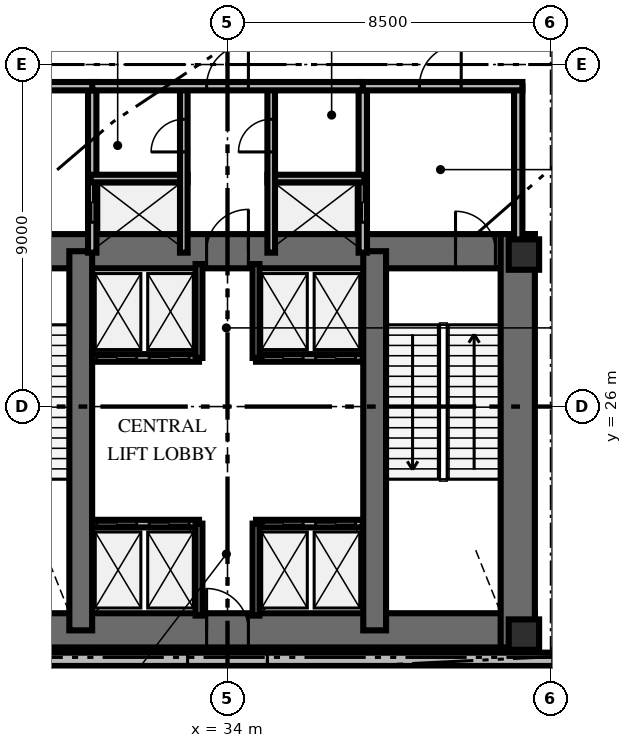
"""IFC4 building model, lengths in metres.
Left out: names, types, materials, properties, quantities, classifications, styles, units other than length and angle.
Written with IfcOpenShell. Run it as: python <this file> out.ifc"""

import sys

from ifc_helpers import new_model, si_unit, direction, frame, frame_2d, origin, origin_2d, place, context, subcontext, project, spatial, rectangle, extrude, element, fill, save


model = new_model("IFC4")
c1 = context("Model", 3, precision=1e-05, world=origin(), true_north=direction((0.0, 1.0)))
c2 = subcontext(c1, "Body", "Model", "MODEL_VIEW")
j1 = project(units=[si_unit("LENGTHUNIT", "METRE"), si_unit("PLANEANGLEUNIT", "RADIAN")], contexts=[c1])
p1 = place(None, origin())
s1 = spatial("IfcSite", under=j1, at=p1, CompositionType="ELEMENT")
p2 = place(p1, origin())
s2 = spatial("IfcBuilding", under=s1, at=p2, CompositionType="ELEMENT")
p3 = place(p2, origin())
s3 = spatial("IfcBuildingStorey", under=s2, at=p3, CompositionType="ELEMENT", Elevation=0.0)
p4 = place(p3, frame((25.922, 20.112, 0.0), z_axis=(0.0, 0.0, 1.0), x_axis=(1.0, 0.0, 0.0)))
e1 = element("IfcWall", 1, at=p4, inside=s3, PredefinedType="SHEAR", context=c2, shape_type="SweptSolid", body=[
    extrude(rectangle(XDim=16.166, YDim=0.9, at=frame_2d((8.083, 0.0))), origin(), (0.0, 0.0, 1.0), 5.4),
])
p5 = place(p4, frame((7.528, 0.0, 0.0)))
e2 = element("IfcOpeningElement", 2, at=p5, cuts=e1, PredefinedType="OPENING", context=c2, shape_type="SweptSolid", body=[
    extrude(rectangle(XDim=1.1, YDim=2.15, at=frame_2d((0.55, 1.075))), frame((0.0, 0.46, 0.0), z_axis=(0.0, -1.0, 0.0), x_axis=(1.0, 0.0, 0.0)), (0.0, 0.0, 1.0), 0.92),
])
p6 = place(p3, frame((25.922, 30.088, 0.0), z_axis=(0.0, 0.0, 1.0), x_axis=(1.0, 0.0, 0.0)))
e3 = element("IfcWall", 3, at=p6, inside=s3, PredefinedType="SHEAR", context=c2, shape_type="SweptSolid", body=[
    extrude(rectangle(XDim=16.166, YDim=0.9, at=frame_2d((8.083, 0.0))), origin(), (0.0, 0.0, 1.0), 5.4),
])
p7 = place(p6, frame((1.028, 0.0, 0.0)))
e4 = element("IfcOpeningElement", 4, at=p7, cuts=e3, PredefinedType="OPENING", context=c2, shape_type="SweptSolid", body=[
    extrude(rectangle(XDim=1.05, YDim=2.15, at=frame_2d((0.525, 1.075))), frame((0.0, 0.46, 0.0), z_axis=(0.0, -1.0, 0.0), x_axis=(1.0, 0.0, 0.0)), (0.0, 0.0, 1.0), 0.92),
])
p8 = place(p6, frame((14.078, 0.0, 0.0)))
e5 = element("IfcOpeningElement", 5, at=p8, cuts=e3, PredefinedType="OPENING", context=c2, shape_type="SweptSolid", body=[
    extrude(rectangle(XDim=1.05, YDim=2.15, at=frame_2d((0.525, 1.075))), frame((0.0, 0.46, 0.0), z_axis=(0.0, -1.0, 0.0), x_axis=(1.0, 0.0, 0.0)), (0.0, 0.0, 1.0), 0.92),
])
p9 = place(p6, frame((7.528, 0.0, 0.0)))
e6 = element("IfcOpeningElement", 6, at=p9, cuts=e3, PredefinedType="OPENING", context=c2, shape_type="SweptSolid", body=[
    extrude(rectangle(XDim=1.1, YDim=2.15, at=frame_2d((0.55, 1.075))), frame((0.0, 0.46, 0.0), z_axis=(0.0, -1.0, 0.0), x_axis=(1.0, 0.0, 0.0)), (0.0, 0.0, 1.0), 0.92),
])
p10 = place(p3, frame((41.638, 19.662, 0.0), z_axis=(0.0, 0.0, 1.0), x_axis=(0.0, 1.0, 0.0)))
e7 = element("IfcWall", 7, at=p10, inside=s3, PredefinedType="SHEAR", context=c2, shape_type="SweptSolid", body=[
    extrude(rectangle(XDim=10.876, YDim=0.9, at=frame_2d((5.438, 0.0))), origin(), (0.0, 0.0, 1.0), 5.4),
])
for number, where, z_axis, x_axis in (
    (8, (30.138, 20.112, 0.0), (0.0, 0.0, 1.0), (0.0, 1.0, 0.0)),
    (9, (37.872, 20.112, 0.0), (0.0, 0.0, 1.0), (0.0, 1.0, 0.0)),
):
    element("IfcWall", number, at=place(p3, frame(where, z_axis=z_axis, x_axis=x_axis)), inside=s3, PredefinedType="SHEAR", context=c2, shape_type="SweptSolid", body=[
        extrude(rectangle(XDim=9.976, YDim=0.6, at=frame_2d((4.988, 0.0))), origin(), (0.0, 0.0, 1.0), 5.4),
    ])
for number, where, z_axis, x_axis in (
    (10, (41.8, 20.0, 0.0), (0.0, 0.0, 1.0), (1.0, 0.0, 0.0)),
    (11, (41.8, 30.0, 0.0), (0.0, 0.0, 1.0), (1.0, 0.0, 0.0)),
):
    element("IfcColumn", number, at=place(p3, frame(where, z_axis=z_axis, x_axis=x_axis)), inside=s3, PredefinedType="PILASTER", context=c2, shape_type="SweptSolid", body=[
        extrude(rectangle(XDim=0.8, YDim=0.8, at=origin_2d()), origin(), (0.0, 0.0, 1.0), 5.4),
    ])
p11 = place(p3, frame((42.62, 19.35, 0.0), z_axis=(0.0, 0.0, 1.0), x_axis=(-1.0, 0.0, 0.0)))
e12 = element("IfcWall", 12, at=p11, inside=s3, PredefinedType="SOLIDWALL", context=c2, shape_type="SweptSolid", body=[
    extrude(rectangle(XDim=17.24, YDim=0.35, at=frame_2d((8.62, 0.0))), origin(), (0.0, 0.0, 1.0), 4.36),
])
p12 = place(p11, frame((7.57, 0.0, 0.0)))
e13 = element("IfcOpeningElement", 13, at=p12, cuts=e12, PredefinedType="OPENING", context=c2, shape_type="SweptSolid", body=[
    extrude(rectangle(XDim=2.1, YDim=2.35, at=frame_2d((1.05, 1.175))), frame((0.0, 0.185, 0.0), z_axis=(0.0, -1.0, 0.0), x_axis=(1.0, 0.0, 0.0)), (0.0, 0.0, 1.0), 0.37),
])
p13 = place(p3, frame((30.44, 30.05, 0.0), z_axis=(0.0, 0.0, 1.0), x_axis=(0.0, 1.0, 0.0)))
e14 = element("IfcWall", 14, at=p13, inside=s3, PredefinedType="SOLIDWALL", context=c2, shape_type="SweptSolid", body=[
    extrude(rectangle(XDim=4.38, YDim=0.22, at=frame_2d((2.19, 0.0))), origin(), (0.0, 0.0, 1.0), 4.16),
])
p14 = place(p13, frame((0.8, 0.0, 0.0)))
e15 = element("IfcOpeningElement", 15, at=p14, cuts=e14, PredefinedType="OPENING", context=c2, shape_type="SweptSolid", body=[
    extrude(rectangle(XDim=1.05, YDim=2.1, at=frame_2d((0.525, 1.05))), frame((0.0, 0.12, 0.0), z_axis=(0.0, -1.0, 0.0), x_axis=(1.0, 0.0, 0.0)), (0.0, 0.0, 1.0), 0.24),
])
p15 = place(p3, frame((26.24, 34.43, 0.0), z_axis=(0.0, 0.0, 1.0), x_axis=(1.0, 0.0, 0.0)))
e16 = element("IfcWall", 16, at=p15, inside=s3, PredefinedType="SOLIDWALL", context=c2, shape_type="SweptSolid", body=[
    extrude(rectangle(XDim=4.31, YDim=0.22, at=frame_2d((2.155, 0.0))), origin(), (0.0, 0.0, 1.0), 4.16),
])
p16 = place(p15, frame((1.6, 0.0, 0.0)))
e17 = element("IfcOpeningElement", 17, at=p16, cuts=e16, PredefinedType="OPENING", context=c2, shape_type="SweptSolid", body=[
    extrude(rectangle(XDim=1.1, YDim=2.15, at=frame_2d((0.55, 1.075))), frame((0.0, 0.12, 0.0), z_axis=(0.0, -1.0, 0.0), x_axis=(1.0, 0.0, 0.0)), (0.0, 0.0, 1.0), 0.24),
])
p17 = place(p3, frame((30.4, 32.0, 0.0), z_axis=(0.0, 0.0, 1.0), x_axis=(1.0, 0.0, 0.0)))
e18 = element("IfcWall", 18, at=p17, inside=s3, PredefinedType="SOLIDWALL", context=c2, shape_type="SweptSolid", body=[
    extrude(rectangle(XDim=2.55, YDim=0.2, at=frame_2d((1.275, 0.0))), origin(), (0.0, 0.0, 1.0), 4.16),
])
p18 = place(p3, frame((32.85, 30.05, 0.0), z_axis=(0.0, 0.0, 1.0), x_axis=(0.0, 1.0, 0.0)))
e19 = element("IfcWall", 19, at=p18, inside=s3, PredefinedType="SOLIDWALL", context=c2, shape_type="SweptSolid", body=[
    extrude(rectangle(XDim=4.38, YDim=0.2, at=frame_2d((2.19, 0.0))), origin(), (0.0, 0.0, 1.0), 4.16),
])
p19 = place(p18, frame((2.65, 0.0, 0.0)))
e20 = element("IfcOpeningElement", 20, at=p19, cuts=e19, PredefinedType="OPENING", context=c2, shape_type="SweptSolid", body=[
    extrude(rectangle(XDim=0.86, YDim=2.05, at=frame_2d((0.43, 1.025))), frame((0.0, 0.11, 0.0), z_axis=(0.0, -1.0, 0.0), x_axis=(1.0, 0.0, 0.0)), (0.0, 0.0, 1.0), 0.22),
])
p20 = place(p3, frame((37.56, 30.05, 0.0), z_axis=(0.0, 0.0, 1.0), x_axis=(0.0, 1.0, 0.0)))
e21 = element("IfcWall", 21, at=p20, inside=s3, PredefinedType="SOLIDWALL", context=c2, shape_type="SweptSolid", body=[
    extrude(rectangle(XDim=4.38, YDim=0.22, at=frame_2d((2.19, 0.0))), origin(), (0.0, 0.0, 1.0), 4.16),
])
p21 = place(p20, frame((0.8, 0.0, 0.0)))
e22 = element("IfcOpeningElement", 22, at=p21, cuts=e21, PredefinedType="OPENING", context=c2, shape_type="SweptSolid", body=[
    extrude(rectangle(XDim=1.05, YDim=2.1, at=frame_2d((0.525, 1.05))), frame((0.0, 0.12, 0.0), z_axis=(0.0, -1.0, 0.0), x_axis=(1.0, 0.0, 0.0)), (0.0, 0.0, 1.0), 0.24),
])
p22 = place(p3, frame((41.65, 30.05, 0.0), z_axis=(0.0, 0.0, 1.0), x_axis=(0.0, 1.0, 0.0)))
e23 = element("IfcWall", 23, at=p22, inside=s3, PredefinedType="SOLIDWALL", context=c2, shape_type="SweptSolid", body=[
    extrude(rectangle(XDim=4.38, YDim=0.22, at=frame_2d((2.19, 0.0))), origin(), (0.0, 0.0, 1.0), 4.16),
])
p23 = place(p3, frame((37.45, 34.43, 0.0), z_axis=(0.0, 0.0, 1.0), x_axis=(1.0, 0.0, 0.0)))
e24 = element("IfcWall", 24, at=p23, inside=s3, PredefinedType="SOLIDWALL", context=c2, shape_type="SweptSolid", body=[
    extrude(rectangle(XDim=4.31, YDim=0.22, at=frame_2d((2.155, 0.0))), origin(), (0.0, 0.0, 1.0), 4.16),
])
p24 = place(p23, frame((1.6, 0.0, 0.0)))
e25 = element("IfcOpeningElement", 25, at=p24, cuts=e24, PredefinedType="OPENING", context=c2, shape_type="SweptSolid", body=[
    extrude(rectangle(XDim=1.1, YDim=2.15, at=frame_2d((0.55, 1.075))), frame((0.0, 0.12, 0.0), z_axis=(0.0, -1.0, 0.0), x_axis=(1.0, 0.0, 0.0)), (0.0, 0.0, 1.0), 0.24),
])
p25 = place(p3, frame((35.05, 32.0, 0.0), z_axis=(0.0, 0.0, 1.0), x_axis=(1.0, 0.0, 0.0)))
e26 = element("IfcWall", 26, at=p25, inside=s3, PredefinedType="SOLIDWALL", context=c2, shape_type="SweptSolid", body=[
    extrude(rectangle(XDim=2.55, YDim=0.2, at=frame_2d((1.275, 0.0))), origin(), (0.0, 0.0, 1.0), 4.16),
])
p26 = place(p3, frame((35.15, 30.05, 0.0), z_axis=(0.0, 0.0, 1.0), x_axis=(0.0, 1.0, 0.0)))
e27 = element("IfcWall", 27, at=p26, inside=s3, PredefinedType="SOLIDWALL", context=c2, shape_type="SweptSolid", body=[
    extrude(rectangle(XDim=4.38, YDim=0.2, at=frame_2d((2.19, 0.0))), origin(), (0.0, 0.0, 1.0), 4.16),
])
p27 = place(p26, frame((2.65, 0.0, 0.0)))
e28 = element("IfcOpeningElement", 28, at=p27, cuts=e27, PredefinedType="OPENING", context=c2, shape_type="SweptSolid", body=[
    extrude(rectangle(XDim=0.86, YDim=2.05, at=frame_2d((0.43, 1.025))), frame((0.0, 0.11, 0.0), z_axis=(0.0, -1.0, 0.0), x_axis=(1.0, 0.0, 0.0)), (0.0, 0.0, 1.0), 0.22),
])
p28 = place(p3, frame((30.44, 34.43, 0.0), z_axis=(0.0, 0.0, 1.0), x_axis=(1.0, 0.0, 0.0)))
e29 = element("IfcWall", 29, at=p28, inside=s3, PredefinedType="SOLIDWALL", context=c2, shape_type="SweptSolid", body=[
    extrude(rectangle(XDim=7.12, YDim=0.22, at=frame_2d((3.56, 0.0))), origin(), (0.0, 0.0, 1.0), 4.16),
])
p29 = place(p28, frame((3.01, 0.0, 0.0)))
e30 = element("IfcOpeningElement", 30, at=p29, cuts=e29, PredefinedType="OPENING", context=c2, shape_type="SweptSolid", body=[
    extrude(rectangle(XDim=1.1, YDim=2.15, at=frame_2d((0.55, 1.075))), frame((0.0, 0.12, 0.0), z_axis=(0.0, -1.0, 0.0), x_axis=(1.0, 0.0, 0.0)), (0.0, 0.0, 1.0), 0.24),
])
p30 = place(p3, frame((30.44, 22.92, 0.0), z_axis=(0.0, 0.0, 1.0), x_axis=(1.0, 0.0, 0.0)))
e31 = element("IfcWall", 31, at=p30, inside=s3, PredefinedType="SOLIDWALL", context=c2, shape_type="SweptSolid", body=[
    extrude(rectangle(XDim=2.81, YDim=0.2, at=frame_2d((1.405, 0.0))), origin(), (0.0, 0.0, 1.0), 4.16),
])
p31 = place(p30, frame((0.12, 0.0, 0.0)))
e32 = element("IfcOpeningElement", 32, at=p31, cuts=e31, PredefinedType="OPENING", context=c2, shape_type="SweptSolid", body=[
    extrude(rectangle(XDim=1.05, YDim=2.1, at=frame_2d((0.525, 1.05))), frame((0.0, 0.11, 0.0), z_axis=(0.0, -1.0, 0.0), x_axis=(1.0, 0.0, 0.0)), (0.0, 0.0, 1.0), 0.22),
])
p32 = place(p30, frame((1.5, 0.0, 0.0)))
e33 = element("IfcOpeningElement", 33, at=p32, cuts=e31, PredefinedType="OPENING", context=c2, shape_type="SweptSolid", body=[
    extrude(rectangle(XDim=1.05, YDim=2.1, at=frame_2d((0.525, 1.05))), frame((0.0, 0.11, 0.0), z_axis=(0.0, -1.0, 0.0), x_axis=(1.0, 0.0, 0.0)), (0.0, 0.0, 1.0), 0.22),
])
p33 = place(p3, frame((33.25, 20.5, 0.0), z_axis=(0.0, 0.0, 1.0), x_axis=(0.0, 1.0, 0.0)))
e34 = element("IfcWall", 34, at=p33, inside=s3, PredefinedType="SOLIDWALL", context=c2, shape_type="SweptSolid", body=[
    extrude(rectangle(XDim=2.42, YDim=0.18, at=frame_2d((1.21, 0.0))), origin(), (0.0, 0.0, 1.0), 4.16),
])
p34 = place(p3, frame((34.75, 22.92, 0.0), z_axis=(0.0, 0.0, 1.0), x_axis=(1.0, 0.0, 0.0)))
e35 = element("IfcWall", 35, at=p34, inside=s3, PredefinedType="SOLIDWALL", context=c2, shape_type="SweptSolid", body=[
    extrude(rectangle(XDim=2.81, YDim=0.2, at=frame_2d((1.405, 0.0))), origin(), (0.0, 0.0, 1.0), 4.16),
])
p35 = place(p34, frame((0.19, 0.0, 0.0)))
e36 = element("IfcOpeningElement", 36, at=p35, cuts=e35, PredefinedType="OPENING", context=c2, shape_type="SweptSolid", body=[
    extrude(rectangle(XDim=1.05, YDim=2.1, at=frame_2d((0.525, 1.05))), frame((0.0, 0.11, 0.0), z_axis=(0.0, -1.0, 0.0), x_axis=(1.0, 0.0, 0.0)), (0.0, 0.0, 1.0), 0.22),
])
p36 = place(p34, frame((1.57, 0.0, 0.0)))
e37 = element("IfcOpeningElement", 37, at=p36, cuts=e35, PredefinedType="OPENING", context=c2, shape_type="SweptSolid", body=[
    extrude(rectangle(XDim=1.05, YDim=2.1, at=frame_2d((0.525, 1.05))), frame((0.0, 0.11, 0.0), z_axis=(0.0, -1.0, 0.0), x_axis=(1.0, 0.0, 0.0)), (0.0, 0.0, 1.0), 0.22),
])
p37 = place(p3, frame((34.75, 20.5, 0.0), z_axis=(0.0, 0.0, 1.0), x_axis=(0.0, 1.0, 0.0)))
e38 = element("IfcWall", 38, at=p37, inside=s3, PredefinedType="SOLIDWALL", context=c2, shape_type="SweptSolid", body=[
    extrude(rectangle(XDim=2.42, YDim=0.18, at=frame_2d((1.21, 0.0))), origin(), (0.0, 0.0, 1.0), 4.16),
])
p38 = place(p3, frame((30.44, 27.28, 0.0), z_axis=(0.0, 0.0, 1.0), x_axis=(1.0, 0.0, 0.0)))
e39 = element("IfcWall", 39, at=p38, inside=s3, PredefinedType="SOLIDWALL", context=c2, shape_type="SweptSolid", body=[
    extrude(rectangle(XDim=2.81, YDim=0.2, at=frame_2d((1.405, 0.0))), origin(), (0.0, 0.0, 1.0), 4.16),
])
p39 = place(p38, frame((0.12, 0.0, 0.0)))
e40 = element("IfcOpeningElement", 40, at=p39, cuts=e39, PredefinedType="OPENING", context=c2, shape_type="SweptSolid", body=[
    extrude(rectangle(XDim=1.05, YDim=2.1, at=frame_2d((0.525, 1.05))), frame((0.0, 0.11, 0.0), z_axis=(0.0, -1.0, 0.0), x_axis=(1.0, 0.0, 0.0)), (0.0, 0.0, 1.0), 0.22),
])
p40 = place(p38, frame((1.5, 0.0, 0.0)))
e41 = element("IfcOpeningElement", 41, at=p40, cuts=e39, PredefinedType="OPENING", context=c2, shape_type="SweptSolid", body=[
    extrude(rectangle(XDim=1.05, YDim=2.1, at=frame_2d((0.525, 1.05))), frame((0.0, 0.11, 0.0), z_axis=(0.0, -1.0, 0.0), x_axis=(1.0, 0.0, 0.0)), (0.0, 0.0, 1.0), 0.22),
])
p41 = place(p3, frame((33.25, 27.28, 0.0), z_axis=(0.0, 0.0, 1.0), x_axis=(0.0, 1.0, 0.0)))
e42 = element("IfcWall", 42, at=p41, inside=s3, PredefinedType="SOLIDWALL", context=c2, shape_type="SweptSolid", body=[
    extrude(rectangle(XDim=2.47, YDim=0.18, at=frame_2d((1.235, 0.0))), origin(), (0.0, 0.0, 1.0), 4.16),
])
p42 = place(p3, frame((34.75, 27.28, 0.0), z_axis=(0.0, 0.0, 1.0), x_axis=(1.0, 0.0, 0.0)))
e43 = element("IfcWall", 43, at=p42, inside=s3, PredefinedType="SOLIDWALL", context=c2, shape_type="SweptSolid", body=[
    extrude(rectangle(XDim=2.81, YDim=0.2, at=frame_2d((1.405, 0.0))), origin(), (0.0, 0.0, 1.0), 4.16),
])
p43 = place(p42, frame((0.19, 0.0, 0.0)))
e44 = element("IfcOpeningElement", 44, at=p43, cuts=e43, PredefinedType="OPENING", context=c2, shape_type="SweptSolid", body=[
    extrude(rectangle(XDim=1.05, YDim=2.1, at=frame_2d((0.525, 1.05))), frame((0.0, 0.11, 0.0), z_axis=(0.0, -1.0, 0.0), x_axis=(1.0, 0.0, 0.0)), (0.0, 0.0, 1.0), 0.22),
])
p44 = place(p42, frame((1.57, 0.0, 0.0)))
e45 = element("IfcOpeningElement", 45, at=p44, cuts=e43, PredefinedType="OPENING", context=c2, shape_type="SweptSolid", body=[
    extrude(rectangle(XDim=1.05, YDim=2.1, at=frame_2d((0.525, 1.05))), frame((0.0, 0.11, 0.0), z_axis=(0.0, -1.0, 0.0), x_axis=(1.0, 0.0, 0.0)), (0.0, 0.0, 1.0), 0.22),
])
p45 = place(p3, frame((34.75, 27.28, 0.0), z_axis=(0.0, 0.0, 1.0), x_axis=(0.0, 1.0, 0.0)))
e46 = element("IfcWall", 46, at=p45, inside=s3, PredefinedType="SOLIDWALL", context=c2, shape_type="SweptSolid", body=[
    extrude(rectangle(XDim=2.47, YDim=0.18, at=frame_2d((1.235, 0.0))), origin(), (0.0, 0.0, 1.0), 4.16),
])
p46 = place(p12, origin())
e47 = element("IfcDoor", 47, at=p46, inside=s3, OperationType="DOUBLE_DOOR_SINGLE_SWING", PredefinedType="DOOR", context=c2, shape_type="SweptSolid", body=[
    extrude(rectangle(XDim=2.1, YDim=2.35, at=frame_2d((1.05, 1.175))), frame((0.0, 0.025, 0.0), z_axis=(0.0, -1.0, 0.0), x_axis=(1.0, 0.0, 0.0)), (0.0, 0.0, 1.0), 0.05),
])
fill(e13, e47)
p47 = place(p8, origin())
e48 = element("IfcDoor", 48, at=p47, inside=s3, OperationType="SINGLE_SWING_LEFT", PredefinedType="DOOR", context=c2, shape_type="SweptSolid", body=[
    extrude(rectangle(XDim=1.05, YDim=2.15, at=frame_2d((0.525, 1.075))), frame((0.0, 0.025, 0.0), z_axis=(0.0, -1.0, 0.0), x_axis=(1.0, 0.0, 0.0)), (0.0, 0.0, 1.0), 0.05),
])
fill(e5, e48)
p48 = place(p9, origin())
e49 = element("IfcDoor", 49, at=p48, inside=s3, OperationType="SINGLE_SWING_RIGHT", PredefinedType="DOOR", context=c2, shape_type="SweptSolid", body=[
    extrude(rectangle(XDim=1.1, YDim=2.15, at=frame_2d((0.55, 1.075))), frame((0.0, 0.025, 0.0), z_axis=(0.0, -1.0, 0.0), x_axis=(1.0, 0.0, 0.0)), (0.0, 0.0, 1.0), 0.05),
])
fill(e6, e49)
p49 = place(p5, origin())
e50 = element("IfcDoor", 50, at=p49, inside=s3, OperationType="SINGLE_SWING_LEFT", PredefinedType="DOOR", context=c2, shape_type="SweptSolid", body=[
    extrude(rectangle(XDim=1.1, YDim=2.15, at=frame_2d((0.55, 1.075))), frame((0.0, 0.025, 0.0), z_axis=(0.0, -1.0, 0.0), x_axis=(1.0, 0.0, 0.0)), (0.0, 0.0, 1.0), 0.05),
])
fill(e2, e50)
p50 = place(p14, origin())
e51 = element("IfcDoor", 51, at=p50, inside=s3, OperationType="DOUBLE_DOOR_SLIDING", PredefinedType="USERDEFINED", context=c2, shape_type="SweptSolid", body=[
    extrude(rectangle(XDim=1.05, YDim=2.1, at=frame_2d((0.525, 1.05))), frame((0.0, 0.025, 0.0), z_axis=(0.0, -1.0, 0.0), x_axis=(1.0, 0.0, 0.0)), (0.0, 0.0, 1.0), 0.05),
])
fill(e15, e51)
p51 = place(p19, origin())
e52 = element("IfcDoor", 52, at=p51, inside=s3, OperationType="SINGLE_SWING_LEFT", PredefinedType="TRAPDOOR", context=c2, shape_type="SweptSolid", body=[
    extrude(rectangle(XDim=0.86, YDim=2.05, at=frame_2d((0.43, 1.025))), frame((0.0, 0.025, 0.0), z_axis=(0.0, -1.0, 0.0), x_axis=(1.0, 0.0, 0.0)), (0.0, 0.0, 1.0), 0.05),
])
fill(e20, e52)
p52 = place(p24, origin())
e53 = element("IfcDoor", 53, at=p52, inside=s3, OperationType="SINGLE_SWING_RIGHT", PredefinedType="DOOR", context=c2, shape_type="SweptSolid", body=[
    extrude(rectangle(XDim=1.1, YDim=2.15, at=frame_2d((0.55, 1.075))), frame((0.0, 0.025, 0.0), z_axis=(0.0, -1.0, 0.0), x_axis=(1.0, 0.0, 0.0)), (0.0, 0.0, 1.0), 0.05),
])
fill(e25, e53)
p53 = place(p21, origin())
e54 = element("IfcDoor", 54, at=p53, inside=s3, OperationType="DOUBLE_DOOR_SLIDING", PredefinedType="USERDEFINED", context=c2, shape_type="SweptSolid", body=[
    extrude(rectangle(XDim=1.05, YDim=2.1, at=frame_2d((0.525, 1.05))), frame((0.0, 0.025, 0.0), z_axis=(0.0, -1.0, 0.0), x_axis=(1.0, 0.0, 0.0)), (0.0, 0.0, 1.0), 0.05),
])
fill(e22, e54)
p54 = place(p27, origin())
e55 = element("IfcDoor", 55, at=p54, inside=s3, OperationType="SINGLE_SWING_LEFT", PredefinedType="TRAPDOOR", context=c2, shape_type="SweptSolid", body=[
    extrude(rectangle(XDim=0.86, YDim=2.05, at=frame_2d((0.43, 1.025))), frame((0.0, 0.025, 0.0), z_axis=(0.0, -1.0, 0.0), x_axis=(1.0, 0.0, 0.0)), (0.0, 0.0, 1.0), 0.05),
])
fill(e28, e55)
p55 = place(p29, origin())
e56 = element("IfcDoor", 56, at=p55, inside=s3, OperationType="SINGLE_SWING_RIGHT", PredefinedType="DOOR", context=c2, shape_type="SweptSolid", body=[
    extrude(rectangle(XDim=1.1, YDim=2.15, at=frame_2d((0.55, 1.075))), frame((0.0, 0.025, 0.0), z_axis=(0.0, -1.0, 0.0), x_axis=(1.0, 0.0, 0.0)), (0.0, 0.0, 1.0), 0.05),
])
fill(e30, e56)
p56 = place(p31, origin())
e57 = element("IfcDoor", 57, at=p56, inside=s3, OperationType="DOUBLE_DOOR_SLIDING", PredefinedType="USERDEFINED", context=c2, shape_type="SweptSolid", body=[
    extrude(rectangle(XDim=1.05, YDim=2.1, at=frame_2d((0.525, 1.05))), frame((0.0, 0.025, 0.0), z_axis=(0.0, -1.0, 0.0), x_axis=(1.0, 0.0, 0.0)), (0.0, 0.0, 1.0), 0.05),
])
fill(e32, e57)
p57 = place(p32, origin())
e58 = element("IfcDoor", 58, at=p57, inside=s3, OperationType="DOUBLE_DOOR_SLIDING", PredefinedType="USERDEFINED", context=c2, shape_type="SweptSolid", body=[
    extrude(rectangle(XDim=1.05, YDim=2.1, at=frame_2d((0.525, 1.05))), frame((0.0, 0.025, 0.0), z_axis=(0.0, -1.0, 0.0), x_axis=(1.0, 0.0, 0.0)), (0.0, 0.0, 1.0), 0.05),
])
fill(e33, e58)
p58 = place(p35, origin())
e59 = element("IfcDoor", 59, at=p58, inside=s3, OperationType="DOUBLE_DOOR_SLIDING", PredefinedType="USERDEFINED", context=c2, shape_type="SweptSolid", body=[
    extrude(rectangle(XDim=1.05, YDim=2.1, at=frame_2d((0.525, 1.05))), frame((0.0, 0.025, 0.0), z_axis=(0.0, -1.0, 0.0), x_axis=(1.0, 0.0, 0.0)), (0.0, 0.0, 1.0), 0.05),
])
fill(e36, e59)
p59 = place(p36, origin())
e60 = element("IfcDoor", 60, at=p59, inside=s3, OperationType="DOUBLE_DOOR_SLIDING", PredefinedType="USERDEFINED", context=c2, shape_type="SweptSolid", body=[
    extrude(rectangle(XDim=1.05, YDim=2.1, at=frame_2d((0.525, 1.05))), frame((0.0, 0.025, 0.0), z_axis=(0.0, -1.0, 0.0), x_axis=(1.0, 0.0, 0.0)), (0.0, 0.0, 1.0), 0.05),
])
fill(e37, e60)
p60 = place(p39, origin())
e61 = element("IfcDoor", 61, at=p60, inside=s3, OperationType="DOUBLE_DOOR_SLIDING", PredefinedType="USERDEFINED", context=c2, shape_type="SweptSolid", body=[
    extrude(rectangle(XDim=1.05, YDim=2.1, at=frame_2d((0.525, 1.05))), frame((0.0, 0.025, 0.0), z_axis=(0.0, -1.0, 0.0), x_axis=(1.0, 0.0, 0.0)), (0.0, 0.0, 1.0), 0.05),
])
fill(e40, e61)
p61 = place(p40, origin())
e62 = element("IfcDoor", 62, at=p61, inside=s3, OperationType="DOUBLE_DOOR_SLIDING", PredefinedType="USERDEFINED", context=c2, shape_type="SweptSolid", body=[
    extrude(rectangle(XDim=1.05, YDim=2.1, at=frame_2d((0.525, 1.05))), frame((0.0, 0.025, 0.0), z_axis=(0.0, -1.0, 0.0), x_axis=(1.0, 0.0, 0.0)), (0.0, 0.0, 1.0), 0.05),
])
fill(e41, e62)
p62 = place(p43, origin())
e63 = element("IfcDoor", 63, at=p62, inside=s3, OperationType="DOUBLE_DOOR_SLIDING", PredefinedType="USERDEFINED", context=c2, shape_type="SweptSolid", body=[
    extrude(rectangle(XDim=1.05, YDim=2.1, at=frame_2d((0.525, 1.05))), frame((0.0, 0.025, 0.0), z_axis=(0.0, -1.0, 0.0), x_axis=(1.0, 0.0, 0.0)), (0.0, 0.0, 1.0), 0.05),
])
fill(e44, e63)
p63 = place(p44, origin())
e64 = element("IfcDoor", 64, at=p63, inside=s3, OperationType="DOUBLE_DOOR_SLIDING", PredefinedType="USERDEFINED", context=c2, shape_type="SweptSolid", body=[
    extrude(rectangle(XDim=1.05, YDim=2.1, at=frame_2d((0.525, 1.05))), frame((0.0, 0.025, 0.0), z_axis=(0.0, -1.0, 0.0), x_axis=(1.0, 0.0, 0.0)), (0.0, 0.0, 1.0), 0.05),
])
fill(e45, e64)
save(model, sys.argv[1])
